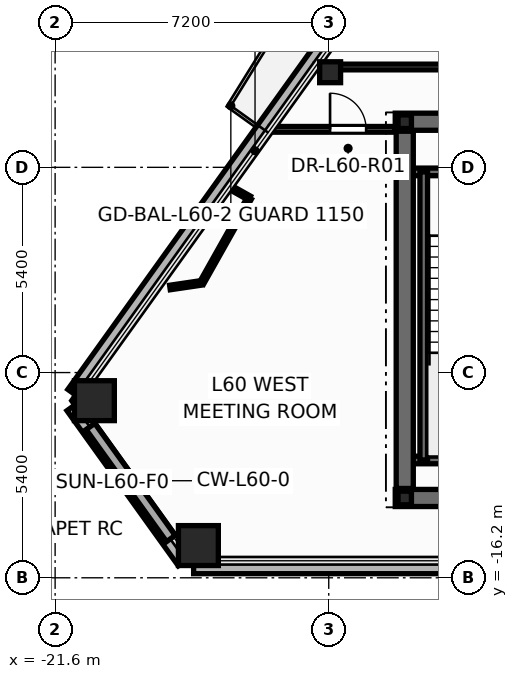
"""IFC4 building model, lengths in metres.
Left out: names, types, materials, properties, quantities, classifications, styles, units other than length and angle.
Written with IfcOpenShell. Run it as: python <this file> out.ifc"""

import sys

from ifc_helpers import new_model, si_unit, direction, frame, frame_2d, origin, origin_2d, place, context, subcontext, project, spatial, rectangle, hollow_rectangle, hollow_circle, i_section, extrude, element, fill, save


model = new_model("IFC4")
c1 = context("Model", 3, precision=1e-05, world=origin(), true_north=direction((0.0, 1.0)))
c2 = subcontext(c1, "Body", "Model", "MODEL_VIEW")
j1 = project(units=[si_unit("LENGTHUNIT", "METRE"), si_unit("PLANEANGLEUNIT", "RADIAN")], contexts=[c1])
p1 = place(None, origin())
s1 = spatial("IfcSite", under=j1, at=p1, CompositionType="ELEMENT")
p2 = place(p1, origin())
s2 = spatial("IfcBuilding", under=s1, at=p2, CompositionType="ELEMENT")
p3 = place(p2, frame((0.0, 0.0, 228.9)))
s3 = spatial("IfcBuildingStorey", under=s2, at=p3, CompositionType="ELEMENT", Elevation=228.9)
for number, where, z_axis, x_axis in (
    (1, (-20.567, -11.54, 0.0), (0.0, 0.0, 1.0), (1.0, 0.0, 0.0)),
    (2, (-17.83, -15.352, 0.0), (0.0, 0.0, 1.0), (1.0, 0.0, 0.0)),
):
    element("IfcColumn", number, at=place(p3, frame(where, z_axis=z_axis, x_axis=x_axis)), inside=s3, PredefinedType="COLUMN", context=c2, shape_type="SweptSolid", body=[
        extrude(hollow_rectangle(XDim=1.05, YDim=1.05, WallThickness=0.045, at=origin_2d()), origin(), (0.0, 0.0, 1.0), 4.5),
    ])
p4 = place(p3, frame((-14.363, -2.897, 0.0), z_axis=(0.0, 0.0, 1.0), x_axis=(1.0, 0.0, 0.0)))
e3 = element("IfcColumn", 3, at=p4, inside=s3, PredefinedType="COLUMN", context=c2, shape_type="SweptSolid", body=[
    extrude(hollow_circle(Radius=0.275, WallThickness=0.024, at=origin_2d()), origin(), (0.0, 0.0, 1.0), 4.5),
])
for number, where, z_axis, x_axis in (
    (4, (-12.4, -14.1, 0.0), (0.0, 0.0, 1.0), (1.0, 0.0, 0.0)),
    (5, (-12.4, -4.2, 0.0), (0.0, 0.0, 1.0), (1.0, 0.0, 0.0)),
):
    element("IfcColumn", number, at=place(p3, frame(where, z_axis=z_axis, x_axis=x_axis)), inside=s3, PredefinedType="COLUMN", context=c2, shape_type="SweptSolid", body=[
        extrude(i_section(OverallWidth=0.352, OverallDepth=0.359, WebThickness=0.018, FlangeThickness=0.026, at=origin_2d()), origin(), (0.0, 0.0, 1.0), 4.5),
    ])
p5 = place(p3, frame((-21.142, -11.698, -0.2), z_axis=(0.0, 0.0, 1.0), x_axis=(0.583125403286, -0.812382153941, 0.0)))
e6 = element("IfcWall", 6, at=p5, inside=s3, PredefinedType="PARAPET", context=c2, shape_type="SweptSolid", body=[
    extrude(rectangle(XDim=5.025, YDim=0.36, at=frame_2d((2.513, 0.0))), origin(), (0.0, 0.0, 1.0), 0.38),
])
p6 = place(p3, frame((-17.955, -15.912, -0.2), z_axis=(0.0, 0.0, 1.0), x_axis=(1.0, 0.0, 0.0)))
e7 = element("IfcWall", 7, at=p6, inside=s3, PredefinedType="PARAPET", context=c2, shape_type="SweptSolid", body=[
    extrude(rectangle(XDim=35.911, YDim=0.36, at=frame_2d((17.955, 0.0))), origin(), (0.0, 0.0, 1.0), 0.38),
])
p7 = place(p3, frame((-11.82, 1.607, -0.2), z_axis=(0.0, 0.0, 1.0), x_axis=(-0.58311922958, -0.812386585373, 0.0)))
e8 = element("IfcWall", 8, at=p7, inside=s3, PredefinedType="PARAPET", context=c2, shape_type="SweptSolid", body=[
    extrude(rectangle(XDim=15.948, YDim=0.36, at=frame_2d((7.974, 0.0))), origin(), (0.0, 0.0, 1.0), 0.38),
])
p8 = place(p3, frame((-12.65, -14.1, 0.0), z_axis=(0.0, 0.0, 1.0), x_axis=(1.0, 0.0, 0.0)))
e9 = element("IfcWall", 9, at=p8, inside=s3, PredefinedType="SHEAR", context=c2, shape_type="SweptSolid", body=[
    extrude(rectangle(XDim=25.3, YDim=0.45, at=frame_2d((12.65, 0.0))), origin(), (0.0, 0.0, 1.0), 4.5),
])
p9 = place(p3, frame((-12.65, -4.2, 0.0), z_axis=(0.0, 0.0, 1.0), x_axis=(1.0, 0.0, 0.0)))
e10 = element("IfcWall", 10, at=p9, inside=s3, PredefinedType="SHEAR", context=c2, shape_type="SweptSolid", body=[
    extrude(rectangle(XDim=25.3, YDim=0.45, at=frame_2d((12.65, 0.0))), origin(), (0.0, 0.0, 1.0), 4.5),
])
p10 = place(p9, frame((1.85, 0.0, 0.0)))
e11 = element("IfcOpeningElement", 11, at=p10, cuts=e10, PredefinedType="OPENING", context=c2, shape_type="SweptSolid", body=[
    extrude(rectangle(XDim=0.756, YDim=2.054, at=frame_2d((0.375, 1.027))), frame((0.0, 0.235, 0.0), z_axis=(0.0, -1.0, 0.0), x_axis=(1.0, 0.0, 0.0)), (0.0, 0.0, 1.0), 0.47),
])
p11 = place(p9, frame((22.65, 0.0, 0.0)))
e12 = element("IfcOpeningElement", 12, at=p11, cuts=e10, PredefinedType="OPENING", context=c2, shape_type="SweptSolid", body=[
    extrude(rectangle(XDim=0.756, YDim=2.054, at=frame_2d((0.375, 1.027))), frame((0.0, 0.235, 0.0), z_axis=(0.0, -1.0, 0.0), x_axis=(1.0, 0.0, 0.0)), (0.0, 0.0, 1.0), 0.47),
])
p12 = place(p9, frame((5.85, 0.0, 0.0)))
e13 = element("IfcOpeningElement", 13, at=p12, cuts=e10, PredefinedType="OPENING", context=c2, shape_type="SweptSolid", body=[
    extrude(rectangle(XDim=1.006, YDim=2.104, at=frame_2d((0.5, 1.052))), frame((0.0, 0.235, 0.0), z_axis=(0.0, -1.0, 0.0), x_axis=(1.0, 0.0, 0.0)), (0.0, 0.0, 1.0), 0.47),
])
p13 = place(p9, frame((10.35, 0.0, 0.0)))
e14 = element("IfcOpeningElement", 14, at=p13, cuts=e10, PredefinedType="OPENING", context=c2, shape_type="SweptSolid", body=[
    extrude(rectangle(XDim=1.406, YDim=2.154, at=frame_2d((0.7, 1.077))), frame((0.0, 0.235, 0.0), z_axis=(0.0, -1.0, 0.0), x_axis=(1.0, 0.0, 0.0)), (0.0, 0.0, 1.0), 0.47),
])
p14 = place(p9, frame((18.45, 0.0, 0.0)))
e15 = element("IfcOpeningElement", 15, at=p14, cuts=e10, PredefinedType="OPENING", context=c2, shape_type="SweptSolid", body=[
    extrude(rectangle(XDim=1.006, YDim=2.104, at=frame_2d((0.5, 1.052))), frame((0.0, 0.235, 0.0), z_axis=(0.0, -1.0, 0.0), x_axis=(1.0, 0.0, 0.0)), (0.0, 0.0, 1.0), 0.47),
])
for number, where, z_axis, x_axis in (
    (16, (-12.35, -5.52, 0.0), (0.0, 0.0, 1.0), (1.0, 0.0, 0.0)),
    (17, (-12.35, -13.1, 0.0), (0.0, 0.0, 1.0), (1.0, 0.0, 0.0)),
):
    element("IfcWall", number, at=place(p3, frame(where, z_axis=z_axis, x_axis=x_axis)), inside=s3, PredefinedType="SOLIDWALL", context=c2, shape_type="SweptSolid", body=[
        extrude(rectangle(XDim=3.87, YDim=0.2, at=frame_2d((1.935, 0.0))), origin(), (0.0, 0.0, 1.0), 4.5),
    ])
p15 = place(p3, frame((-11.9, -13.1, 0.0), z_axis=(0.0, 0.0, 1.0), x_axis=(0.0, 1.0, 0.0)))
e18 = element("IfcWall", 18, at=p15, inside=s3, PredefinedType="SOLIDWALL", context=c2, shape_type="SweptSolid", body=[
    extrude(rectangle(XDim=7.58, YDim=0.2, at=frame_2d((3.79, 0.0))), origin(), (0.0, 0.0, 1.0), 4.5),
])
p16 = place(p3, frame((-12.4, -13.85, 0.0), z_axis=(0.0, 0.0, 1.0), x_axis=(0.0, 1.0, 0.0)))
e19 = element("IfcWall", 19, at=p16, inside=s3, PredefinedType="SHEAR", context=c2, shape_type="SweptSolid", body=[
    extrude(rectangle(XDim=9.4, YDim=0.45, at=frame_2d((4.7, 0.0))), origin(), (0.0, 0.0, 1.0), 4.5),
])
p17 = place(p3, frame((-14.757, -2.76, 0.0), z_axis=(0.0, 0.0, 1.0), x_axis=(1.0, 0.0, 0.0)))
e20 = element("IfcWall", 20, at=p17, inside=s3, PredefinedType="PARTITIONING", context=c2, shape_type="SweptSolid", body=[
    extrude(rectangle(XDim=9.657, YDim=0.15, at=frame_2d((4.829, 0.0))), origin(), (0.0, 0.0, 1.0), 3.22),
])
p18 = place(p17, frame((3.885, 0.0, 0.0)))
e21 = element("IfcOpeningElement", 21, at=p18, cuts=e20, PredefinedType="OPENING", context=c2, shape_type="SweptSolid", body=[
    extrude(rectangle(XDim=0.956, YDim=2.104, at=frame_2d((0.475, 1.052))), frame((0.0, 0.085, 0.0), z_axis=(0.0, -1.0, 0.0), x_axis=(1.0, 0.0, 0.0)), (0.0, 0.0, 1.0), 0.17),
])
p19 = place(p3, frame((-15.935, -4.4, 0.0), z_axis=(0.0, 0.0, 1.0), x_axis=(1.0, 0.0, 0.0)))
e22 = element("IfcWall", 22, at=p19, inside=s3, PredefinedType="PARTITIONING", context=c2, shape_type="SweptSolid", body=[
    extrude(rectangle(XDim=3.282, YDim=0.15, at=frame_2d((1.641, 0.0))), origin(), (0.0, 0.0, 1.0), 3.22),
])
p20 = place(p19, frame((1.569, 0.0, 0.0)))
e23 = element("IfcOpeningElement", 23, at=p20, cuts=e22, PredefinedType="OPENING", context=c2, shape_type="SweptSolid", body=[
    extrude(rectangle(XDim=0.956, YDim=2.104, at=frame_2d((0.475, 1.052))), frame((0.0, 0.085, 0.0), z_axis=(0.0, -1.0, 0.0), x_axis=(1.0, 0.0, 0.0)), (0.0, 0.0, 1.0), 0.17),
])
p21 = place(p3, frame((-16.488, -6.21, 0.0), z_axis=(0.0, 0.0, 1.0), x_axis=(-0.490329227995, -0.87153729018, 0.0)))
e24 = element("IfcWall", 24, at=p21, inside=s3, PredefinedType="PARTITIONING", context=c2, shape_type="SweptSolid", body=[
    extrude(rectangle(XDim=2.557, YDim=0.12, at=frame_2d((1.279, 0.0))), origin(), (0.0, 0.0, 1.0), 4.245),
])
p22 = place(p3, frame((-17.742, -8.439, 0.0), z_axis=(0.0, 0.0, 1.0), x_axis=(-0.989322448528, -0.145743242855, 0.0)))
e25 = element("IfcWall", 25, at=p22, inside=s3, PredefinedType="PARTITIONING", context=c2, shape_type="SweptSolid", body=[
    extrude(rectangle(XDim=0.846, YDim=0.12, at=frame_2d((0.423, 0.0))), origin(), (0.0, 0.0, 1.0), 3.763),
])
p23 = place(p3, frame((-17.01, -5.916, 0.0), z_axis=(0.0, 0.0, 1.0), x_axis=(0.871532028392, -0.49033858046, 0.0)))
e26 = element("IfcWall", 26, at=p23, inside=s3, PredefinedType="PARTITIONING", context=c2, shape_type="SweptSolid", body=[
    extrude(rectangle(XDim=0.599, YDim=0.12, at=frame_2d((0.3, 0.0))), origin(), (0.0, 0.0, 1.0), 3.763),
])
p24 = place(p20, origin())
e27 = element("IfcDoor", 27, at=p24, inside=s3, OperationType="SINGLE_SWING_LEFT", PredefinedType="DOOR", context=c2, shape_type="SweptSolid", body=[
    extrude(rectangle(XDim=0.95, YDim=2.1, at=frame_2d((0.475, 1.05))), frame((0.0, 0.025, 0.0), z_axis=(0.0, -1.0, 0.0), x_axis=(1.0, 0.0, 0.0)), (0.0, 0.0, 1.0), 0.05),
])
fill(e23, e27)
save(model, sys.argv[1])
